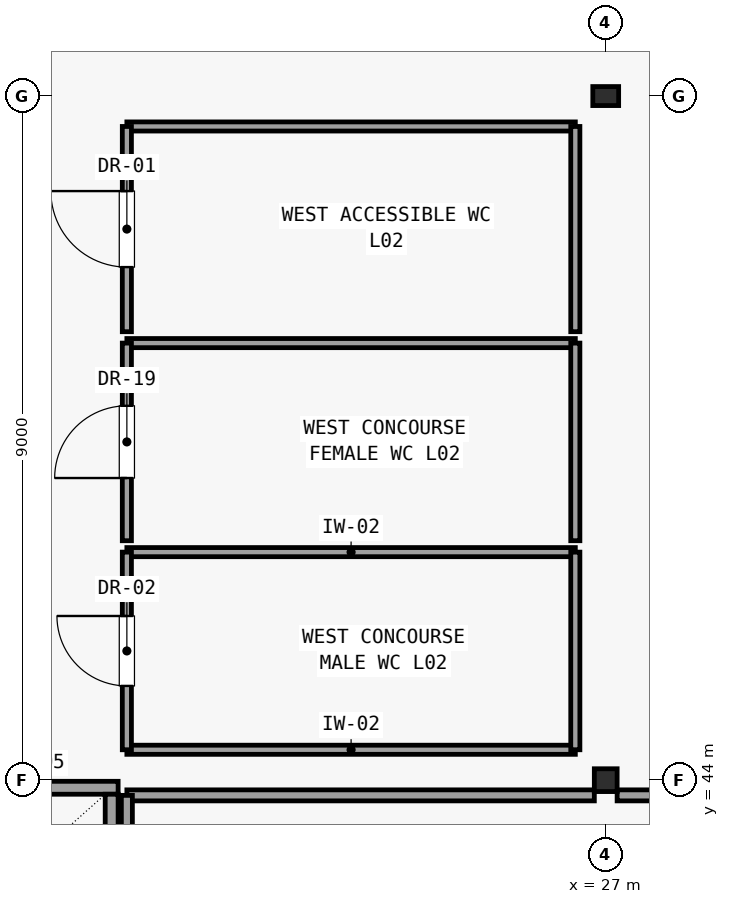
"""IFC4 building model, lengths in metres.
Left out: names, types, materials, properties, quantities, classifications, styles, units other than length and angle.
Written with IfcOpenShell. Run it as: python <this file> out.ifc"""

import sys

from ifc_helpers import new_model, si_unit, direction, frame, frame_2d, origin, origin_2d, place, context, subcontext, project, spatial, rectangle, hollow_rectangle, i_section, extrude, element, fill, save


model = new_model("IFC4")
c1 = context("Model", 3, precision=1e-05, world=origin(), true_north=direction((0.0, 1.0)))
c2 = subcontext(c1, "Body", "Model", "MODEL_VIEW")
j1 = project(units=[si_unit("LENGTHUNIT", "METRE"), si_unit("PLANEANGLEUNIT", "RADIAN")], contexts=[c1])
p1 = place(None, origin())
s1 = spatial("IfcSite", under=j1, at=p1, CompositionType="ELEMENT")
p2 = place(p1, origin())
s2 = spatial("IfcBuilding", under=s1, at=p2, CompositionType="ELEMENT")
p3 = place(p2, frame((0.0, 0.0, 9.3)))
s3 = spatial("IfcBuildingStorey", under=s2, at=p3, CompositionType="ELEMENT", Elevation=9.3)
p4 = place(p3, frame((27.0, 44.0, 0.0), z_axis=(0.0, 0.0, 1.0), x_axis=(1.0, 0.0, 0.0)))
e1 = element("IfcColumn", 1, at=p4, inside=s3, PredefinedType="COLUMN", context=c2, shape_type="SweptSolid", body=[
    extrude(hollow_rectangle(XDim=0.3, YDim=0.3, WallThickness=0.012, at=origin_2d()), origin(), (0.0, 0.0, 1.0), 4.14),
])
p5 = place(p3, frame((27.0, 53.0, 0.0), z_axis=(0.0, 0.0, 1.0), x_axis=(1.0, 0.0, 0.0)))
e2 = element("IfcColumn", 2, at=p5, inside=s3, PredefinedType="COLUMN", context=c2, shape_type="SweptSolid", body=[
    extrude(i_section(OverallWidth=0.25, OverallDepth=0.34, WebThickness=0.009, FlangeThickness=0.014, FilletRadius=0.01, at=origin_2d()), origin(), (0.0, 0.0, 1.0), 4.14),
])
p6 = place(p3, frame((18.415, 43.9, 0.0), z_axis=(0.0, 0.0, 1.0), x_axis=(1.0, 0.0, 0.0)))
e3 = element("IfcWall", 3, at=p6, inside=s3, PredefinedType="PARTITIONING", context=c2, shape_type="SweptSolid", body=[
    extrude(rectangle(XDim=2.17, YDim=0.17, at=frame_2d((1.085, 0.0))), origin(), (0.0, 0.0, 1.0), 3.332),
])
p7 = place(p3, frame((20.5, 42.185, 0.0), z_axis=(0.0, 0.0, 1.0), x_axis=(0.0, 1.0, 0.0)))
e4 = element("IfcWall", 4, at=p7, inside=s3, PredefinedType="PARTITIONING", context=c2, shape_type="SweptSolid", body=[
    extrude(rectangle(XDim=1.63, YDim=0.17, at=frame_2d((0.815, 0.0))), origin(), (0.0, 0.0, 1.0), 3.332),
])
for number, where, z_axis, x_axis in (
    (5, (20.7, 44.4, 0.0), (0.0, 0.0, 1.0), (1.0, 0.0, 0.0)),
    (6, (20.7, 47.0, 0.0), (0.0, 0.0, 1.0), (1.0, 0.0, 0.0)),
):
    element("IfcWall", number, at=place(p3, frame(where, z_axis=z_axis, x_axis=x_axis)), inside=s3, PredefinedType="PARTITIONING", context=c2, shape_type="SweptSolid", body=[
        extrude(rectangle(XDim=5.9, YDim=0.12, at=frame_2d((2.95, 0.0))), origin(), (0.0, 0.0, 1.0), 3.92),
    ])
p8 = place(p3, frame((20.7, 44.4, 0.0), z_axis=(0.0, 0.0, 1.0), x_axis=(0.0, 1.0, 0.0)))
e7 = element("IfcWall", 7, at=p8, inside=s3, PredefinedType="PARTITIONING", context=c2, shape_type="SweptSolid", body=[
    extrude(rectangle(XDim=2.6, YDim=0.12, at=frame_2d((1.3, 0.0))), origin(), (0.0, 0.0, 1.0), 3.92),
])
p9 = place(p8, frame((0.84, 0.0, 0.0)))
e8 = element("IfcOpeningElement", 8, at=p9, cuts=e7, PredefinedType="OPENING", context=c2, shape_type="SweptSolid", body=[
    extrude(rectangle(XDim=0.92, YDim=2.1, at=frame_2d((0.46, 1.05))), frame((0.0, 0.071, 0.0), z_axis=(0.0, -1.0, 0.0), x_axis=(1.0, 0.0, 0.0)), (0.0, 0.0, 1.0), 0.142),
])
p10 = place(p3, frame((26.6, 44.4, 0.0), z_axis=(0.0, 0.0, 1.0), x_axis=(0.0, 1.0, 0.0)))
e9 = element("IfcWall", 9, at=p10, inside=s3, PredefinedType="PARTITIONING", context=c2, shape_type="SweptSolid", body=[
    extrude(rectangle(XDim=2.6, YDim=0.12, at=frame_2d((1.3, 0.0))), origin(), (0.0, 0.0, 1.0), 3.92),
])
p11 = place(p3, frame((20.7, 49.75, 0.0), z_axis=(0.0, 0.0, 1.0), x_axis=(1.0, 0.0, 0.0)))
e10 = element("IfcWall", 10, at=p11, inside=s3, PredefinedType="PARTITIONING", context=c2, shape_type="SweptSolid", body=[
    extrude(rectangle(XDim=5.9, YDim=0.12, at=frame_2d((2.95, 0.0))), origin(), (0.0, 0.0, 1.0), 3.92),
])
p12 = place(p3, frame((20.7, 47.15, 0.0), z_axis=(0.0, 0.0, 1.0), x_axis=(0.0, 1.0, 0.0)))
e11 = element("IfcWall", 11, at=p12, inside=s3, PredefinedType="PARTITIONING", context=c2, shape_type="SweptSolid", body=[
    extrude(rectangle(XDim=2.6, YDim=0.12, at=frame_2d((1.3, 0.0))), origin(), (0.0, 0.0, 1.0), 3.67),
])
p13 = place(p12, frame((0.825, 0.0, 0.0)))
e12 = element("IfcOpeningElement", 12, at=p13, cuts=e11, PredefinedType="OPENING", context=c2, shape_type="SweptSolid", body=[
    extrude(rectangle(XDim=0.95, YDim=2.15, at=frame_2d((0.475, 1.075))), frame((0.0, 0.071, 0.0), z_axis=(0.0, -1.0, 0.0), x_axis=(1.0, 0.0, 0.0)), (0.0, 0.0, 1.0), 0.142),
])
p14 = place(p3, frame((26.6, 47.15, 0.0), z_axis=(0.0, 0.0, 1.0), x_axis=(0.0, 1.0, 0.0)))
e13 = element("IfcWall", 13, at=p14, inside=s3, PredefinedType="PARTITIONING", context=c2, shape_type="SweptSolid", body=[
    extrude(rectangle(XDim=2.6, YDim=0.12, at=frame_2d((1.3, 0.0))), origin(), (0.0, 0.0, 1.0), 3.67),
])
p15 = place(p3, frame((20.7, 52.6, 0.0), z_axis=(0.0, 0.0, 1.0), x_axis=(1.0, 0.0, 0.0)))
e14 = element("IfcWall", 14, at=p15, inside=s3, PredefinedType="PARTITIONING", context=c2, shape_type="SweptSolid", body=[
    extrude(rectangle(XDim=5.9, YDim=0.12, at=frame_2d((2.95, 0.0))), origin(), (0.0, 0.0, 1.0), 3.92),
])
p16 = place(p3, frame((20.7, 49.9, 0.0), z_axis=(0.0, 0.0, 1.0), x_axis=(0.0, 1.0, 0.0)))
e15 = element("IfcWall", 15, at=p16, inside=s3, PredefinedType="PARTITIONING", context=c2, shape_type="SweptSolid", body=[
    extrude(rectangle(XDim=2.7, YDim=0.12, at=frame_2d((1.35, 0.0))), origin(), (0.0, 0.0, 1.0), 3.92),
])
p17 = place(p16, frame((0.85, 0.0, 0.0)))
e16 = element("IfcOpeningElement", 16, at=p17, cuts=e15, PredefinedType="OPENING", context=c2, shape_type="SweptSolid", body=[
    extrude(rectangle(XDim=1.0, YDim=2.15, at=frame_2d((0.5, 1.075))), frame((0.0, 0.071, 0.0), z_axis=(0.0, -1.0, 0.0), x_axis=(1.0, 0.0, 0.0)), (0.0, 0.0, 1.0), 0.142),
])
p18 = place(p3, frame((26.6, 49.9, 0.0), z_axis=(0.0, 0.0, 1.0), x_axis=(0.0, 1.0, 0.0)))
e17 = element("IfcWall", 17, at=p18, inside=s3, PredefinedType="PARTITIONING", context=c2, shape_type="SweptSolid", body=[
    extrude(rectangle(XDim=2.7, YDim=0.12, at=frame_2d((1.35, 0.0))), origin(), (0.0, 0.0, 1.0), 3.92),
])
p19 = place(p3, frame((20.7, 43.8, 0.0), z_axis=(0.0, 0.0, 1.0), x_axis=(1.0, 0.0, 0.0)))
e18 = element("IfcWall", 18, at=p19, inside=s3, PredefinedType="PARTITIONING", context=c2, shape_type="SweptSolid", body=[
    extrude(rectangle(XDim=6.15, YDim=0.145, at=frame_2d((3.075, 0.0))), origin(), (0.0, 0.0, 1.0), 3.332),
])
p20 = place(p3, frame((27.15, 43.8, 0.0), z_axis=(0.0, 0.0, 1.0), x_axis=(1.0, 0.0, 0.0)))
e19 = element("IfcWall", 19, at=p20, inside=s3, PredefinedType="PARTITIONING", context=c2, shape_type="SweptSolid", body=[
    extrude(rectangle(XDim=8.685, YDim=0.145, at=frame_2d((4.343, 0.0))), origin(), (0.0, 0.0, 1.0), 3.332),
])
p21 = place(p3, frame((20.7, 27.2, 0.0), z_axis=(0.0, 0.0, 1.0), x_axis=(0.0, 1.0, 0.0)))
e20 = element("IfcWall", 20, at=p21, inside=s3, PredefinedType="PARTITIONING", context=c2, shape_type="SweptSolid", body=[
    extrude(rectangle(XDim=16.6, YDim=0.145, at=frame_2d((8.3, 0.0))), origin(), (0.0, 0.0, 1.0), 3.332),
])
p22 = place(p21, frame((12.03, 0.0, 0.0)))
e21 = element("IfcOpeningElement", 21, at=p22, cuts=e20, PredefinedType="OPENING", context=c2, shape_type="SweptSolid", body=[
    extrude(rectangle(XDim=1.14, YDim=2.2, at=frame_2d((0.57, 1.1))), frame((0.0, 0.083, 0.0), z_axis=(0.0, -1.0, 0.0), x_axis=(1.0, 0.0, 0.0)), (0.0, 0.0, 1.0), 0.167),
])
p23 = place(p9, origin())
e22 = element("IfcDoor", 22, at=p23, inside=s3, OperationType="SINGLE_SWING_RIGHT", PredefinedType="DOOR", context=c2, shape_type="SweptSolid", body=[
    extrude(rectangle(XDim=0.92, YDim=2.1, at=frame_2d((0.46, 1.05))), frame((0.0, 0.025, 0.0), z_axis=(0.0, -1.0, 0.0), x_axis=(1.0, 0.0, 0.0)), (0.0, 0.0, 1.0), 0.05),
])
fill(e8, e22)
p24 = place(p13, origin())
e23 = element("IfcDoor", 23, at=p24, inside=s3, OperationType="SINGLE_SWING_LEFT", PredefinedType="DOOR", context=c2, shape_type="SweptSolid", body=[
    extrude(rectangle(XDim=0.95, YDim=2.15, at=frame_2d((0.475, 1.075))), frame((0.0, 0.025, 0.0), z_axis=(0.0, -1.0, 0.0), x_axis=(1.0, 0.0, 0.0)), (0.0, 0.0, 1.0), 0.05),
])
fill(e12, e23)
p25 = place(p17, origin())
e24 = element("IfcDoor", 24, at=p25, inside=s3, OperationType="SINGLE_SWING_RIGHT", PredefinedType="DOOR", context=c2, shape_type="SweptSolid", body=[
    extrude(rectangle(XDim=1.0, YDim=2.15, at=frame_2d((0.5, 1.075))), frame((0.0, 0.025, 0.0), z_axis=(0.0, -1.0, 0.0), x_axis=(1.0, 0.0, 0.0)), (0.0, 0.0, 1.0), 0.05),
])
fill(e16, e24)
save(model, sys.argv[1])
